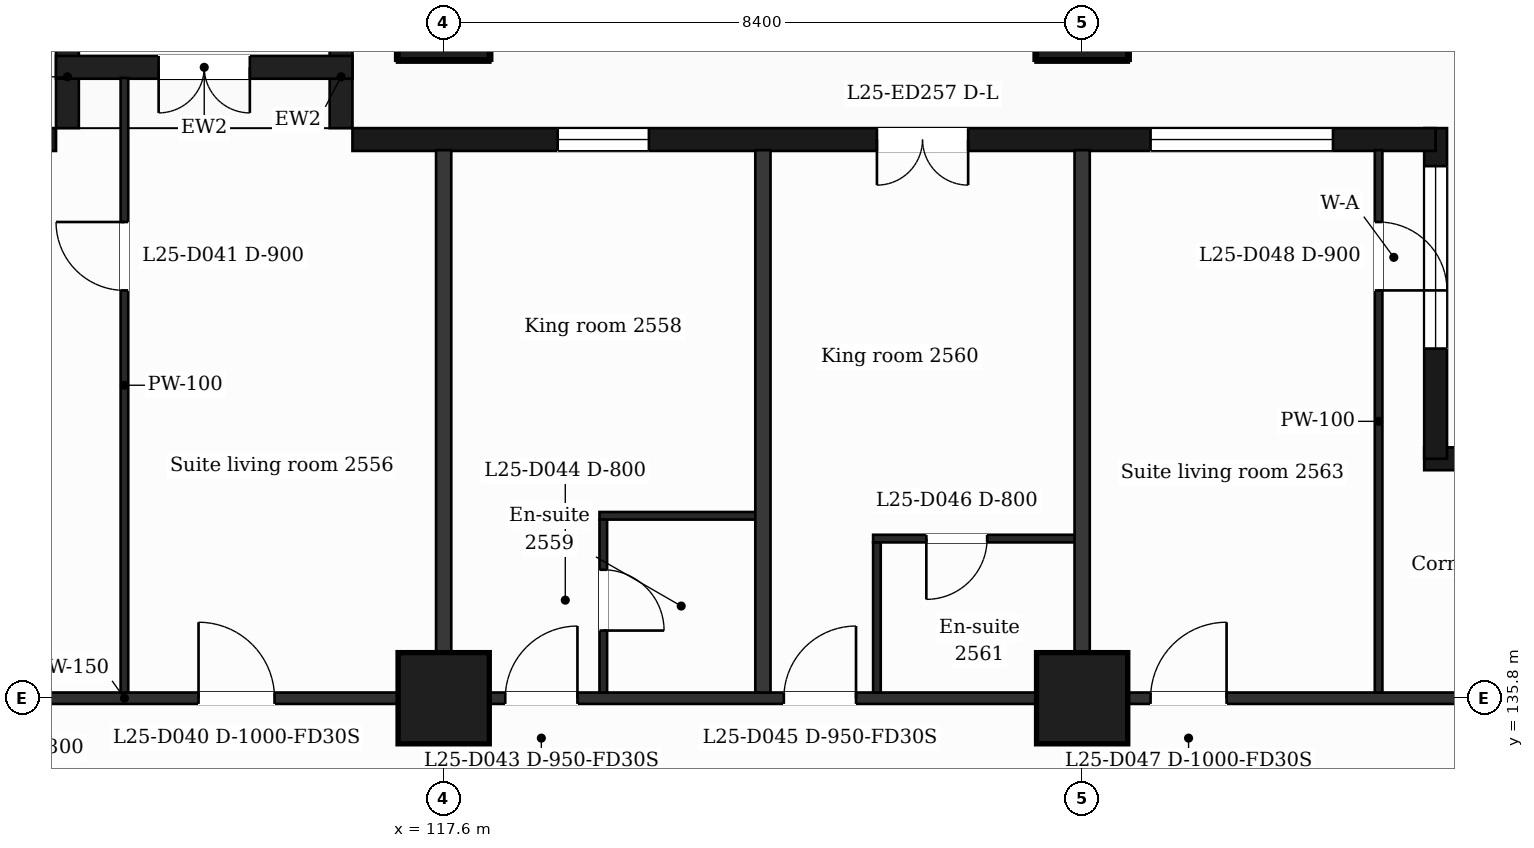
"""IFC4 building model, lengths in metres.
Left out: names, types, materials, properties, quantities, classifications, styles, units other than length and angle.
Written with IfcOpenShell. Run it as: python <this file> out.ifc"""

import sys

from ifc_helpers import new_model, si_unit, direction, frame, frame_2d, origin, origin_2d, place, context, subcontext, project, spatial, rectangle, extrude, element, fill, save


model = new_model("IFC4")
c1 = context("Model", 3, precision=1e-05, world=origin(), true_north=direction((0.0, 1.0)))
c2 = subcontext(c1, "Body", "Model", "MODEL_VIEW")
j1 = project(units=[si_unit("LENGTHUNIT", "METRE"), si_unit("PLANEANGLEUNIT", "RADIAN")], contexts=[c1])
p1 = place(None, origin())
s1 = spatial("IfcSite", under=j1, at=p1, CompositionType="ELEMENT")
p2 = place(p1, origin())
s2 = spatial("IfcBuilding", under=s1, at=p2, CompositionType="ELEMENT")
p3 = place(p2, frame((0.0, 0.0, 109.5)))
s3 = spatial("IfcBuildingStorey", under=s2, at=p3, CompositionType="ELEMENT", Elevation=109.5)
for number, where, z_axis, x_axis in (
    (1, (117.6, 135.8, 0.0), (0.0, 0.0, 1.0), (1.0, 0.0, 0.0)),
    (2, (126.0, 135.8, 0.0), (0.0, 0.0, 1.0), (1.0, 0.0, 0.0)),
    (3, (117.6, 144.8, 0.0), (0.0, 0.0, 1.0), (1.0, 0.0, 0.0)),
    (4, (126.0, 144.8, 0.0), (0.0, 0.0, 1.0), (1.0, 0.0, 0.0)),
):
    element("IfcColumn", number, at=place(p3, frame(where, z_axis=z_axis, x_axis=x_axis)), inside=s3, PredefinedType="COLUMN", context=c2, shape_type="SweptSolid", body=[
        extrude(rectangle(XDim=1.2, YDim=1.2, at=origin_2d()), origin(), (0.0, 0.0, 1.0), 3.7),
    ])
p4 = place(p3, frame((135.623, 138.95, 0.0), z_axis=(0.0, 0.0, 1.0), x_axis=(-1.0, 0.0, 0.0)))
e5 = element("IfcWall", 5, at=p4, inside=s3, PredefinedType="SOLIDWALL", context=c2, shape_type="SweptSolid", body=[
    extrude(rectangle(XDim=5.123, YDim=0.3, at=frame_2d((2.561, 0.0))), origin(), (0.0, 0.0, 1.0), 3.38),
])
p5 = place(p4, frame((1.673, 0.0, 0.9)))
e6 = element("IfcOpeningElement", 6, at=p5, cuts=e5, PredefinedType="OPENING", context=c2, shape_type="SweptSolid", body=[
    extrude(rectangle(XDim=1.2, YDim=2.1, at=frame_2d((0.6, 1.05))), frame((0.0, 0.16, 0.0), z_axis=(0.0, -1.0, 0.0), x_axis=(1.0, 0.0, 0.0)), (0.0, 0.0, 1.0), 0.32),
])
p6 = place(p4, frame((3.473, 0.0, 0.9)))
e7 = element("IfcOpeningElement", 7, at=p6, cuts=e5, PredefinedType="OPENING", context=c2, shape_type="SweptSolid", body=[
    extrude(rectangle(XDim=1.2, YDim=2.1, at=frame_2d((0.6, 1.05))), frame((0.0, 0.16, 0.0), z_axis=(0.0, -1.0, 0.0), x_axis=(1.0, 0.0, 0.0)), (0.0, 0.0, 1.0), 0.32),
])
p7 = place(p3, frame((130.65, 138.95, 0.0), z_axis=(0.0, 0.0, 1.0), x_axis=(0.0, 1.0, 0.0)))
e8 = element("IfcWall", 8, at=p7, inside=s3, PredefinedType="SOLIDWALL", context=c2, shape_type="SweptSolid", body=[
    extrude(rectangle(XDim=4.35, YDim=0.3, at=frame_2d((2.175, 0.0))), origin(), (0.0, 0.0, 1.0), 3.38),
])
p8 = place(p7, frame((1.45, 0.0, 0.9)))
e9 = element("IfcOpeningElement", 9, at=p8, cuts=e8, PredefinedType="OPENING", context=c2, shape_type="SweptSolid", body=[
    extrude(rectangle(XDim=2.4, YDim=2.1, at=frame_2d((1.2, 1.05))), frame((0.0, 0.16, 0.0), z_axis=(0.0, -1.0, 0.0), x_axis=(1.0, 0.0, 0.0)), (0.0, 0.0, 1.0), 0.32),
])
p9 = place(p3, frame((130.65, 143.15, 0.0), z_axis=(0.0, 0.0, 1.0), x_axis=(-1.0, 0.0, 0.0)))
e10 = element("IfcWall", 10, at=p9, inside=s3, PredefinedType="SOLIDWALL", context=c2, shape_type="SweptSolid", body=[
    extrude(rectangle(XDim=14.25, YDim=0.3, at=frame_2d((7.125, 0.0))), origin(), (0.0, 0.0, 1.0), 3.38),
])
p10 = place(p9, frame((1.35, 0.0, 0.9)))
e11 = element("IfcOpeningElement", 11, at=p10, cuts=e10, PredefinedType="OPENING", context=c2, shape_type="SweptSolid", body=[
    extrude(rectangle(XDim=2.4, YDim=2.1, at=frame_2d((1.2, 1.05))), frame((0.0, 0.16, 0.0), z_axis=(0.0, -1.0, 0.0), x_axis=(1.0, 0.0, 0.0)), (0.0, 0.0, 1.0), 0.32),
])
p11 = place(p9, frame((6.15, 0.0, 0.0)))
e12 = element("IfcOpeningElement", 12, at=p11, cuts=e10, PredefinedType="OPENING", context=c2, shape_type="SweptSolid", body=[
    extrude(rectangle(XDim=1.2, YDim=2.4, at=frame_2d((0.6, 1.2))), frame((0.0, 0.16, 0.0), z_axis=(0.0, -1.0, 0.0), x_axis=(1.0, 0.0, 0.0)), (0.0, 0.0, 1.0), 0.32),
])
p12 = place(p9, frame((10.35, 0.0, 0.9)))
e13 = element("IfcOpeningElement", 13, at=p12, cuts=e10, PredefinedType="OPENING", context=c2, shape_type="SweptSolid", body=[
    extrude(rectangle(XDim=1.2, YDim=2.1, at=frame_2d((0.6, 1.05))), frame((0.0, 0.16, 0.0), z_axis=(0.0, -1.0, 0.0), x_axis=(1.0, 0.0, 0.0)), (0.0, 0.0, 1.0), 0.32),
])
p13 = place(p3, frame((112.5, 143.15, 0.0), z_axis=(0.0, 0.0, 1.0), x_axis=(-1.0, 0.0, 0.0)))
e14 = element("IfcWall", 14, at=p13, inside=s3, PredefinedType="SOLIDWALL", context=c2, shape_type="SweptSolid", body=[
    extrude(rectangle(XDim=16.5, YDim=0.3, at=frame_2d((8.25, 0.0))), origin(), (0.0, 0.0, 1.0), 3.38),
])
p14 = place(p13, frame((0.5, 0.0, 0.9)))
e15 = element("IfcOpeningElement", 15, at=p14, cuts=e14, PredefinedType="OPENING", context=c2, shape_type="SweptSolid", body=[
    extrude(rectangle(XDim=2.4, YDim=2.1, at=frame_2d((1.2, 1.05))), frame((0.0, 0.16, 0.0), z_axis=(0.0, -1.0, 0.0), x_axis=(1.0, 0.0, 0.0)), (0.0, 0.0, 1.0), 0.32),
])
p15 = place(p13, frame((4.2, 0.0, 0.9)))
e16 = element("IfcOpeningElement", 16, at=p15, cuts=e14, PredefinedType="OPENING", context=c2, shape_type="SweptSolid", body=[
    extrude(rectangle(XDim=2.4, YDim=2.1, at=frame_2d((1.2, 1.05))), frame((0.0, 0.16, 0.0), z_axis=(0.0, -1.0, 0.0), x_axis=(1.0, 0.0, 0.0)), (0.0, 0.0, 1.0), 0.32),
])
p16 = place(p13, frame((9.0, 0.0, 0.0)))
e17 = element("IfcOpeningElement", 17, at=p16, cuts=e14, PredefinedType="OPENING", context=c2, shape_type="SweptSolid", body=[
    extrude(rectangle(XDim=1.2, YDim=2.4, at=frame_2d((0.6, 1.2))), frame((0.0, 0.16, 0.0), z_axis=(0.0, -1.0, 0.0), x_axis=(1.0, 0.0, 0.0)), (0.0, 0.0, 1.0), 0.32),
])
p17 = place(p13, frame((12.6, 0.0, 0.9)))
e18 = element("IfcOpeningElement", 18, at=p17, cuts=e14, PredefinedType="OPENING", context=c2, shape_type="SweptSolid", body=[
    extrude(rectangle(XDim=2.4, YDim=2.1, at=frame_2d((1.2, 1.05))), frame((0.0, 0.16, 0.0), z_axis=(0.0, -1.0, 0.0), x_axis=(1.0, 0.0, 0.0)), (0.0, 0.0, 1.0), 0.32),
])
for number, where, z_axis, x_axis in (
    (19, (116.25, 143.3, 0.0), (0.0, 0.0, 1.0), (0.0, 1.0, 0.0)),
    (20, (112.65, 143.3, 0.0), (0.0, 0.0, 1.0), (0.0, 1.0, 0.0)),
):
    element("IfcWall", number, at=place(p3, frame(where, z_axis=z_axis, x_axis=x_axis)), inside=s3, PredefinedType="SOLIDWALL", context=c2, shape_type="SweptSolid", body=[
        extrude(rectangle(XDim=1.35, YDim=0.3, at=frame_2d((0.675, 0.0))), origin(), (0.0, 0.0, 1.0), 3.38),
    ])
p18 = place(p3, frame((116.4, 144.1, 0.0), z_axis=(0.0, 0.0, 1.0), x_axis=(-1.0, 0.0, 0.0)))
e21 = element("IfcWall", 21, at=p18, inside=s3, PredefinedType="SOLIDWALL", context=c2, shape_type="SweptSolid", body=[
    extrude(rectangle(XDim=3.9, YDim=0.3, at=frame_2d((1.95, 0.0))), origin(), (0.0, 0.0, 1.0), 3.38),
])
p19 = place(p18, frame((1.35, 0.0, 0.0)))
e22 = element("IfcOpeningElement", 22, at=p19, cuts=e21, PredefinedType="OPENING", context=c2, shape_type="SweptSolid", body=[
    extrude(rectangle(XDim=1.2, YDim=2.4, at=frame_2d((0.6, 1.2))), frame((0.0, 0.16, 0.0), z_axis=(0.0, -1.0, 0.0), x_axis=(1.0, 0.0, 0.0)), (0.0, 0.0, 1.0), 0.32),
])
p20 = place(p3, frame((90.895, 135.8, 0.0), z_axis=(0.0, 0.0, 1.0), x_axis=(1.0, 0.0, 0.0)))
e23 = element("IfcWall", 23, at=p20, inside=s3, PredefinedType="PARTITIONING", context=c2, shape_type="SweptSolid", body=[
    extrude(rectangle(XDim=45.011, YDim=0.15, at=frame_2d((22.505, 0.0))), origin(), (0.0, 0.0, 1.0), 3.38),
])
p21 = place(p20, frame((6.906, 0.0, 0.0)))
e24 = element("IfcOpeningElement", 24, at=p21, cuts=e23, PredefinedType="OPENING", context=c2, shape_type="SweptSolid", body=[
    extrude(rectangle(XDim=1.0, YDim=2.1, at=frame_2d((0.5, 1.05))), frame((0.0, 0.085, 0.0), z_axis=(0.0, -1.0, 0.0), x_axis=(1.0, 0.0, 0.0)), (0.0, 0.0, 1.0), 0.17),
])
p22 = place(p20, frame((12.13, 0.0, 0.0)))
e25 = element("IfcOpeningElement", 25, at=p22, cuts=e23, PredefinedType="OPENING", context=c2, shape_type="SweptSolid", body=[
    extrude(rectangle(XDim=1.0, YDim=2.1, at=frame_2d((0.5, 1.05))), frame((0.0, 0.085, 0.0), z_axis=(0.0, -1.0, 0.0), x_axis=(1.0, 0.0, 0.0)), (0.0, 0.0, 1.0), 0.17),
])
p23 = place(p20, frame((23.48, 0.0, 0.0)))
e26 = element("IfcOpeningElement", 26, at=p23, cuts=e23, PredefinedType="OPENING", context=c2, shape_type="SweptSolid", body=[
    extrude(rectangle(XDim=1.0, YDim=2.1, at=frame_2d((0.5, 1.05))), frame((0.0, 0.085, 0.0), z_axis=(0.0, -1.0, 0.0), x_axis=(1.0, 0.0, 0.0)), (0.0, 0.0, 1.0), 0.17),
])
p24 = place(p20, frame((27.515, 0.0, 0.0)))
e27 = element("IfcOpeningElement", 27, at=p24, cuts=e23, PredefinedType="OPENING", context=c2, shape_type="SweptSolid", body=[
    extrude(rectangle(XDim=0.95, YDim=2.1, at=frame_2d((0.475, 1.05))), frame((0.0, 0.085, 0.0), z_axis=(0.0, -1.0, 0.0), x_axis=(1.0, 0.0, 0.0)), (0.0, 0.0, 1.0), 0.17),
])
p25 = place(p20, frame((31.18, 0.0, 0.0)))
e28 = element("IfcOpeningElement", 28, at=p25, cuts=e23, PredefinedType="OPENING", context=c2, shape_type="SweptSolid", body=[
    extrude(rectangle(XDim=0.95, YDim=2.1, at=frame_2d((0.475, 1.05))), frame((0.0, 0.085, 0.0), z_axis=(0.0, -1.0, 0.0), x_axis=(1.0, 0.0, 0.0)), (0.0, 0.0, 1.0), 0.17),
])
p26 = place(p20, frame((36.005, 0.0, 0.0)))
e29 = element("IfcOpeningElement", 29, at=p26, cuts=e23, PredefinedType="OPENING", context=c2, shape_type="SweptSolid", body=[
    extrude(rectangle(XDim=1.0, YDim=2.1, at=frame_2d((0.5, 1.05))), frame((0.0, 0.085, 0.0), z_axis=(0.0, -1.0, 0.0), x_axis=(1.0, 0.0, 0.0)), (0.0, 0.0, 1.0), 0.17),
])
p27 = place(p3, frame((123.25, 137.9, 0.0), z_axis=(0.0, 0.0, 1.0), x_axis=(1.0, 0.0, 0.0)))
e30 = element("IfcWall", 30, at=p27, inside=s3, PredefinedType="PARTITIONING", context=c2, shape_type="SweptSolid", body=[
    extrude(rectangle(XDim=2.75, YDim=0.1, at=frame_2d((1.375, 0.0))), origin(), (0.0, 0.0, 1.0), 3.38),
])
p28 = place(p27, frame((0.7, 0.0, 0.0)))
e31 = element("IfcOpeningElement", 31, at=p28, cuts=e30, PredefinedType="OPENING", context=c2, shape_type="SweptSolid", body=[
    extrude(rectangle(XDim=0.8, YDim=2.1, at=frame_2d((0.4, 1.05))), frame((0.0, 0.06, 0.0), z_axis=(0.0, -1.0, 0.0), x_axis=(1.0, 0.0, 0.0)), (0.0, 0.0, 1.0), 0.12),
])
p29 = place(p3, frame((119.65, 138.2, 0.0), z_axis=(0.0, 0.0, 1.0), x_axis=(1.0, 0.0, 0.0)))
e32 = element("IfcWall", 32, at=p29, inside=s3, PredefinedType="PARTITIONING", context=c2, shape_type="SweptSolid", body=[
    extrude(rectangle(XDim=2.15, YDim=0.1, at=frame_2d((1.075, 0.0))), origin(), (0.0, 0.0, 1.0), 3.38),
])
p30 = place(p3, frame((113.4, 135.875, 0.0), z_axis=(0.0, 0.0, 1.0), x_axis=(0.0, 1.0, 0.0)))
e33 = element("IfcWall", 33, at=p30, inside=s3, PredefinedType="PARTITIONING", context=c2, shape_type="SweptSolid", body=[
    extrude(rectangle(XDim=8.085, YDim=0.1, at=frame_2d((4.042, 0.0))), origin(), (0.0, 0.0, 1.0), 3.38),
])
p31 = place(p30, frame((5.29, 0.0, 0.0)))
e34 = element("IfcOpeningElement", 34, at=p31, cuts=e33, PredefinedType="OPENING", context=c2, shape_type="SweptSolid", body=[
    extrude(rectangle(XDim=0.9, YDim=2.1, at=frame_2d((0.45, 1.05))), frame((0.0, 0.06, 0.0), z_axis=(0.0, -1.0, 0.0), x_axis=(1.0, 0.0, 0.0)), (0.0, 0.0, 1.0), 0.12),
])
p32 = place(p3, frame((117.6, 135.875, 0.0), z_axis=(0.0, 0.0, 1.0), x_axis=(0.0, 1.0, 0.0)))
e35 = element("IfcWall", 35, at=p32, inside=s3, PredefinedType="PARTITIONING", context=c2, shape_type="SweptSolid", body=[
    extrude(rectangle(XDim=7.135, YDim=0.2, at=frame_2d((3.567, 0.0))), origin(), (0.0, 0.0, 1.0), 3.38),
])
p33 = place(p3, frame((119.7, 135.875, 0.0), z_axis=(0.0, 0.0, 1.0), x_axis=(0.0, 1.0, 0.0)))
e36 = element("IfcWall", 36, at=p33, inside=s3, PredefinedType="PARTITIONING", context=c2, shape_type="SweptSolid", body=[
    extrude(rectangle(XDim=2.275, YDim=0.1, at=frame_2d((1.137, 0.0))), origin(), (0.0, 0.0, 1.0), 3.38),
])
p34 = place(p33, frame((0.815, 0.0, 0.0)))
e37 = element("IfcOpeningElement", 37, at=p34, cuts=e36, PredefinedType="OPENING", context=c2, shape_type="SweptSolid", body=[
    extrude(rectangle(XDim=0.8, YDim=2.1, at=frame_2d((0.4, 1.05))), frame((0.0, 0.06, 0.0), z_axis=(0.0, -1.0, 0.0), x_axis=(1.0, 0.0, 0.0)), (0.0, 0.0, 1.0), 0.12),
])
p35 = place(p3, frame((121.8, 135.875, 0.0), z_axis=(0.0, 0.0, 1.0), x_axis=(0.0, 1.0, 0.0)))
e38 = element("IfcWall", 38, at=p35, inside=s3, PredefinedType="PARTITIONING", context=c2, shape_type="SweptSolid", body=[
    extrude(rectangle(XDim=7.135, YDim=0.2, at=frame_2d((3.567, 0.0))), origin(), (0.0, 0.0, 1.0), 3.38),
])
p36 = place(p3, frame((123.3, 135.875, 0.0), z_axis=(0.0, 0.0, 1.0), x_axis=(0.0, 1.0, 0.0)))
e39 = element("IfcWall", 39, at=p36, inside=s3, PredefinedType="PARTITIONING", context=c2, shape_type="SweptSolid", body=[
    extrude(rectangle(XDim=1.975, YDim=0.1, at=frame_2d((0.988, 0.0))), origin(), (0.0, 0.0, 1.0), 3.38),
])
p37 = place(p3, frame((126.0, 135.875, 0.0), z_axis=(0.0, 0.0, 1.0), x_axis=(0.0, 1.0, 0.0)))
e40 = element("IfcWall", 40, at=p37, inside=s3, PredefinedType="PARTITIONING", context=c2, shape_type="SweptSolid", body=[
    extrude(rectangle(XDim=7.135, YDim=0.2, at=frame_2d((3.567, 0.0))), origin(), (0.0, 0.0, 1.0), 3.38),
])
p38 = place(p3, frame((129.9, 135.875, 0.0), z_axis=(0.0, 0.0, 1.0), x_axis=(0.0, 1.0, 0.0)))
e41 = element("IfcWall", 41, at=p38, inside=s3, PredefinedType="PARTITIONING", context=c2, shape_type="SweptSolid", body=[
    extrude(rectangle(XDim=7.135, YDim=0.1, at=frame_2d((3.567, 0.0))), origin(), (0.0, 0.0, 1.0), 3.38),
])
p39 = place(p38, frame((5.29, 0.0, 0.0)))
e42 = element("IfcOpeningElement", 42, at=p39, cuts=e41, PredefinedType="OPENING", context=c2, shape_type="SweptSolid", body=[
    extrude(rectangle(XDim=0.9, YDim=2.1, at=frame_2d((0.45, 1.05))), frame((0.0, 0.06, 0.0), z_axis=(0.0, -1.0, 0.0), x_axis=(1.0, 0.0, 0.0)), (0.0, 0.0, 1.0), 0.12),
])
p40 = place(p8, origin())
e43 = element("IfcWindow", 43, at=p40, inside=s3, PartitioningType="SINGLE_PANEL", PredefinedType="WINDOW", context=c2, shape_type="SweptSolid", body=[
    extrude(rectangle(XDim=2.4, YDim=2.1, at=frame_2d((1.2, 1.05))), frame((0.0, 0.03, 0.0), z_axis=(0.0, -1.0, 0.0), x_axis=(1.0, 0.0, 0.0)), (0.0, 0.0, 1.0), 0.06),
])
fill(e9, e43)
p41 = place(p10, origin())
e44 = element("IfcWindow", 44, at=p41, inside=s3, PartitioningType="SINGLE_PANEL", PredefinedType="WINDOW", context=c2, shape_type="SweptSolid", body=[
    extrude(rectangle(XDim=2.4, YDim=2.1, at=frame_2d((1.2, 1.05))), frame((0.0, 0.03, 0.0), z_axis=(0.0, -1.0, 0.0), x_axis=(1.0, 0.0, 0.0)), (0.0, 0.0, 1.0), 0.06),
])
fill(e11, e44)
p42 = place(p11, origin())
e45 = element("IfcDoor", 45, at=p42, inside=s3, OperationType="DOUBLE_DOOR_SINGLE_SWING", PredefinedType="DOOR", context=c2, shape_type="SweptSolid", body=[
    extrude(rectangle(XDim=1.2, YDim=2.4, at=frame_2d((0.6, 1.2))), frame((0.0, 0.025, 0.0), z_axis=(0.0, -1.0, 0.0), x_axis=(1.0, 0.0, 0.0)), (0.0, 0.0, 1.0), 0.05),
])
fill(e12, e45)
p43 = place(p12, origin())
e46 = element("IfcWindow", 46, at=p43, inside=s3, PartitioningType="SINGLE_PANEL", PredefinedType="WINDOW", context=c2, shape_type="SweptSolid", body=[
    extrude(rectangle(XDim=1.2, YDim=2.1, at=frame_2d((0.6, 1.05))), frame((0.0, 0.03, 0.0), z_axis=(0.0, -1.0, 0.0), x_axis=(1.0, 0.0, 0.0)), (0.0, 0.0, 1.0), 0.06),
])
fill(e13, e46)
p44 = place(p19, origin())
e47 = element("IfcDoor", 47, at=p44, inside=s3, OperationType="DOUBLE_DOOR_SINGLE_SWING", PredefinedType="DOOR", context=c2, shape_type="SweptSolid", body=[
    extrude(rectangle(XDim=1.2, YDim=2.4, at=frame_2d((0.6, 1.2))), frame((0.0, 0.025, 0.0), z_axis=(0.0, -1.0, 0.0), x_axis=(1.0, 0.0, 0.0)), (0.0, 0.0, 1.0), 0.05),
])
fill(e22, e47)
p45 = place(p23, origin())
e48 = element("IfcDoor", 48, at=p45, inside=s3, OperationType="SINGLE_SWING_LEFT", PredefinedType="DOOR", context=c2, shape_type="SweptSolid", body=[
    extrude(rectangle(XDim=1.0, YDim=2.1, at=frame_2d((0.5, 1.05))), frame((0.0, 0.025, 0.0), z_axis=(0.0, -1.0, 0.0), x_axis=(1.0, 0.0, 0.0)), (0.0, 0.0, 1.0), 0.05),
])
fill(e26, e48)
p46 = place(p31, origin())
e49 = element("IfcDoor", 49, at=p46, inside=s3, OperationType="SINGLE_SWING_RIGHT", PredefinedType="DOOR", context=c2, shape_type="SweptSolid", body=[
    extrude(rectangle(XDim=0.9, YDim=2.1, at=frame_2d((0.45, 1.05))), frame((0.0, 0.025, 0.0), z_axis=(0.0, -1.0, 0.0), x_axis=(1.0, 0.0, 0.0)), (0.0, 0.0, 1.0), 0.05),
])
fill(e34, e49)
p47 = place(p24, origin())
e50 = element("IfcDoor", 50, at=p47, inside=s3, OperationType="SINGLE_SWING_RIGHT", PredefinedType="DOOR", context=c2, shape_type="SweptSolid", body=[
    extrude(rectangle(XDim=0.95, YDim=2.1, at=frame_2d((0.475, 1.05))), frame((0.0, 0.025, 0.0), z_axis=(0.0, -1.0, 0.0), x_axis=(1.0, 0.0, 0.0)), (0.0, 0.0, 1.0), 0.05),
])
fill(e27, e50)
p48 = place(p34, origin())
e51 = element("IfcDoor", 51, at=p48, inside=s3, OperationType="SINGLE_SWING_LEFT", PredefinedType="DOOR", context=c2, shape_type="SweptSolid", body=[
    extrude(rectangle(XDim=0.8, YDim=2.1, at=frame_2d((0.4, 1.05))), frame((0.0, 0.025, 0.0), z_axis=(0.0, -1.0, 0.0), x_axis=(1.0, 0.0, 0.0)), (0.0, 0.0, 1.0), 0.05),
])
fill(e37, e51)
p49 = place(p25, origin())
e52 = element("IfcDoor", 52, at=p49, inside=s3, OperationType="SINGLE_SWING_RIGHT", PredefinedType="DOOR", context=c2, shape_type="SweptSolid", body=[
    extrude(rectangle(XDim=0.95, YDim=2.1, at=frame_2d((0.475, 1.05))), frame((0.0, 0.025, 0.0), z_axis=(0.0, -1.0, 0.0), x_axis=(1.0, 0.0, 0.0)), (0.0, 0.0, 1.0), 0.05),
])
fill(e28, e52)
p50 = place(p28, origin())
e53 = element("IfcDoor", 53, at=p50, inside=s3, OperationType="SINGLE_SWING_LEFT", PredefinedType="DOOR", context=c2, shape_type="SweptSolid", body=[
    extrude(rectangle(XDim=0.8, YDim=2.1, at=frame_2d((0.4, 1.05))), frame((0.0, 0.025, 0.0), z_axis=(0.0, -1.0, 0.0), x_axis=(1.0, 0.0, 0.0)), (0.0, 0.0, 1.0), 0.05),
])
fill(e31, e53)
p51 = place(p26, origin())
e54 = element("IfcDoor", 54, at=p51, inside=s3, OperationType="SINGLE_SWING_RIGHT", PredefinedType="DOOR", context=c2, shape_type="SweptSolid", body=[
    extrude(rectangle(XDim=1.0, YDim=2.1, at=frame_2d((0.5, 1.05))), frame((0.0, 0.025, 0.0), z_axis=(0.0, -1.0, 0.0), x_axis=(1.0, 0.0, 0.0)), (0.0, 0.0, 1.0), 0.05),
])
fill(e29, e54)
p52 = place(p39, origin())
e55 = element("IfcDoor", 55, at=p52, inside=s3, OperationType="SINGLE_SWING_LEFT", PredefinedType="DOOR", context=c2, shape_type="SweptSolid", body=[
    extrude(rectangle(XDim=0.9, YDim=2.1, at=frame_2d((0.45, 1.05))), frame((0.0, 0.025, 0.0), z_axis=(0.0, -1.0, 0.0), x_axis=(1.0, 0.0, 0.0)), (0.0, 0.0, 1.0), 0.05),
])
fill(e42, e55)
save(model, sys.argv[1])
